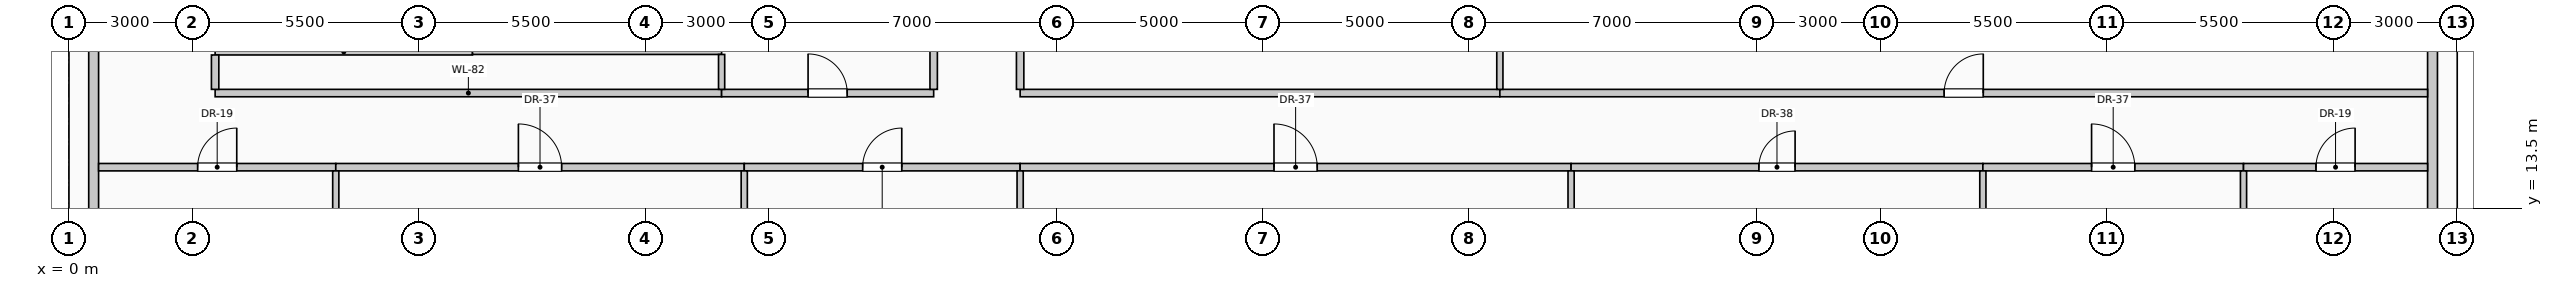
"""IFC4 building model, lengths in metres.
Left out: names, types, materials, properties, quantities, classifications, styles, units other than length and angle.
Written with IfcOpenShell. Run it as: python <this file> out.ifc"""

import sys

from ifc_helpers import new_model, si_unit, direction, frame, frame_2d, origin, place, context, subcontext, project, spatial, rectangle, extrude, element, fill, save


model = new_model("IFC4")
c1 = context("Model", 3, precision=1e-05, world=origin(), true_north=direction((0.0, 1.0)))
c2 = subcontext(c1, "Body", "Model", "MODEL_VIEW")
j1 = project(units=[si_unit("LENGTHUNIT", "METRE"), si_unit("PLANEANGLEUNIT", "RADIAN")], contexts=[c1])
p1 = place(None, origin())
s1 = spatial("IfcSite", under=j1, at=p1, CompositionType="ELEMENT")
p2 = place(p1, origin())
s2 = spatial("IfcBuilding", under=s1, at=p2, CompositionType="ELEMENT")
p3 = place(p2, frame((0.0, 0.0, 210.6)))
s3 = spatial("IfcBuildingStorey", under=s2, at=p3, CompositionType="ELEMENT", Elevation=210.6)
p4 = place(p3, frame((0.6, 10.42, 0.0), z_axis=(0.0, 0.0, 1.0), x_axis=(0.0, 1.0, 0.0)))
e1 = element("IfcWall", 1, at=p4, inside=s3, PredefinedType="SOLIDWALL", context=c2, shape_type="SweptSolid", body=[
    extrude(rectangle(XDim=7.16, YDim=0.24, at=frame_2d((3.58, 0.0))), origin(), (0.0, 0.0, 1.0), 3.0),
])
p5 = place(p4, frame((1.387, 0.0, 0.42)))
e2 = element("IfcOpeningElement", 2, at=p5, cuts=e1, PredefinedType="OPENING", context=c2, shape_type="SweptSolid", body=[
    extrude(rectangle(XDim=1.5, YDim=2.2, at=frame_2d((0.75, 1.1))), frame((0.0, 0.13, 0.0), z_axis=(0.0, -1.0, 0.0), x_axis=(1.0, 0.0, 0.0)), (0.0, 0.0, 1.0), 0.26),
])
p6 = place(p3, frame((57.4, 17.58, 0.0), z_axis=(0.0, 0.0, 1.0), x_axis=(0.0, -1.0, 0.0)))
e3 = element("IfcWall", 3, at=p6, inside=s3, PredefinedType="SOLIDWALL", context=c2, shape_type="SweptSolid", body=[
    extrude(rectangle(XDim=7.16, YDim=0.24, at=frame_2d((3.58, 0.0))), origin(), (0.0, 0.0, 1.0), 3.0),
])
p7 = place(p6, frame((4.273, 0.0, 0.42)))
e4 = element("IfcOpeningElement", 4, at=p7, cuts=e3, PredefinedType="OPENING", context=c2, shape_type="SweptSolid", body=[
    extrude(rectangle(XDim=1.5, YDim=2.2, at=frame_2d((0.75, 1.1))), frame((0.0, 0.13, 0.0), z_axis=(0.0, -1.0, 0.0), x_axis=(1.0, 0.0, 0.0)), (0.0, 0.0, 1.0), 0.26),
])
p8 = place(p3, frame((0.72, 14.5, 0.0), z_axis=(0.0, 0.0, 1.0), x_axis=(1.0, 0.0, 0.0)))
e5 = element("IfcWall", 5, at=p8, inside=s3, PredefinedType="PARTITIONING", context=c2, shape_type="SweptSolid", body=[
    extrude(rectangle(XDim=5.76, YDim=0.18, at=frame_2d((2.88, 0.0))), origin(), (0.0, 0.0, 1.0), 3.75),
])
p9 = place(p8, frame((2.405, 0.0, 0.0)))
e6 = element("IfcOpeningElement", 6, at=p9, cuts=e5, PredefinedType="OPENING", context=c2, shape_type="SweptSolid", body=[
    extrude(rectangle(XDim=0.95, YDim=2.15, at=frame_2d((0.475, 1.075))), frame((0.0, 0.1, 0.0), z_axis=(0.0, -1.0, 0.0), x_axis=(1.0, 0.0, 0.0)), (0.0, 0.0, 1.0), 0.2),
])
p10 = place(p3, frame((6.48, 14.5, 0.0), z_axis=(0.0, 0.0, 1.0), x_axis=(1.0, 0.0, 0.0)))
e7 = element("IfcWall", 7, at=p10, inside=s3, PredefinedType="PARTITIONING", context=c2, shape_type="SweptSolid", body=[
    extrude(rectangle(XDim=9.92, YDim=0.18, at=frame_2d((4.96, 0.0))), origin(), (0.0, 0.0, 1.0), 3.75),
])
p11 = place(p10, frame((4.435, 0.0, 0.0)))
e8 = element("IfcOpeningElement", 8, at=p11, cuts=e7, PredefinedType="OPENING", context=c2, shape_type="SweptSolid", body=[
    extrude(rectangle(XDim=1.05, YDim=2.15, at=frame_2d((0.525, 1.075))), frame((0.0, 0.1, 0.0), z_axis=(0.0, -1.0, 0.0), x_axis=(1.0, 0.0, 0.0)), (0.0, 0.0, 1.0), 0.2),
])
p12 = place(p3, frame((16.4, 14.5, 0.0), z_axis=(0.0, 0.0, 1.0), x_axis=(1.0, 0.0, 0.0)))
e9 = element("IfcWall", 9, at=p12, inside=s3, PredefinedType="PARTITIONING", context=c2, shape_type="SweptSolid", body=[
    extrude(rectangle(XDim=6.7, YDim=0.18, at=frame_2d((3.35, 0.0))), origin(), (0.0, 0.0, 1.0), 3.75),
])
p13 = place(p12, frame((2.875, 0.0, 0.0)))
e10 = element("IfcOpeningElement", 10, at=p13, cuts=e9, PredefinedType="OPENING", context=c2, shape_type="SweptSolid", body=[
    extrude(rectangle(XDim=0.95, YDim=2.15, at=frame_2d((0.475, 1.075))), frame((0.0, 0.1, 0.0), z_axis=(0.0, -1.0, 0.0), x_axis=(1.0, 0.0, 0.0)), (0.0, 0.0, 1.0), 0.2),
])
p14 = place(p3, frame((23.1, 14.5, 0.0), z_axis=(0.0, 0.0, 1.0), x_axis=(1.0, 0.0, 0.0)))
e11 = element("IfcWall", 11, at=p14, inside=s3, PredefinedType="PARTITIONING", context=c2, shape_type="SweptSolid", body=[
    extrude(rectangle(XDim=13.38, YDim=0.18, at=frame_2d((6.69, 0.0))), origin(), (0.0, 0.0, 1.0), 3.75),
])
p15 = place(p14, frame((6.165, 0.0, 0.0)))
e12 = element("IfcOpeningElement", 12, at=p15, cuts=e11, PredefinedType="OPENING", context=c2, shape_type="SweptSolid", body=[
    extrude(rectangle(XDim=1.05, YDim=2.15, at=frame_2d((0.525, 1.075))), frame((0.0, 0.1, 0.0), z_axis=(0.0, -1.0, 0.0), x_axis=(1.0, 0.0, 0.0)), (0.0, 0.0, 1.0), 0.2),
])
p16 = place(p3, frame((36.48, 14.5, 0.0), z_axis=(0.0, 0.0, 1.0), x_axis=(1.0, 0.0, 0.0)))
e13 = element("IfcWall", 13, at=p16, inside=s3, PredefinedType="PARTITIONING", context=c2, shape_type="SweptSolid", body=[
    extrude(rectangle(XDim=10.0, YDim=0.18, at=frame_2d((5.0, 0.0))), origin(), (0.0, 0.0, 1.0), 3.75),
])
p17 = place(p16, frame((4.56, 0.0, 0.0)))
e14 = element("IfcOpeningElement", 14, at=p17, cuts=e13, PredefinedType="OPENING", context=c2, shape_type="SweptSolid", body=[
    extrude(rectangle(XDim=0.88, YDim=2.1, at=frame_2d((0.44, 1.05))), frame((0.0, 0.1, 0.0), z_axis=(0.0, -1.0, 0.0), x_axis=(1.0, 0.0, 0.0)), (0.0, 0.0, 1.0), 0.2),
])
p18 = place(p3, frame((46.48, 14.5, 0.0), z_axis=(0.0, 0.0, 1.0), x_axis=(1.0, 0.0, 0.0)))
e15 = element("IfcWall", 15, at=p18, inside=s3, PredefinedType="PARTITIONING", context=c2, shape_type="SweptSolid", body=[
    extrude(rectangle(XDim=6.33, YDim=0.18, at=frame_2d((3.165, 0.0))), origin(), (0.0, 0.0, 1.0), 3.75),
])
p19 = place(p18, frame((2.64, 0.0, 0.0)))
e16 = element("IfcOpeningElement", 16, at=p19, cuts=e15, PredefinedType="OPENING", context=c2, shape_type="SweptSolid", body=[
    extrude(rectangle(XDim=1.05, YDim=2.15, at=frame_2d((0.525, 1.075))), frame((0.0, 0.1, 0.0), z_axis=(0.0, -1.0, 0.0), x_axis=(1.0, 0.0, 0.0)), (0.0, 0.0, 1.0), 0.2),
])
p20 = place(p3, frame((52.81, 14.5, 0.0), z_axis=(0.0, 0.0, 1.0), x_axis=(1.0, 0.0, 0.0)))
e17 = element("IfcWall", 17, at=p20, inside=s3, PredefinedType="PARTITIONING", context=c2, shape_type="SweptSolid", body=[
    extrude(rectangle(XDim=4.47, YDim=0.18, at=frame_2d((2.235, 0.0))), origin(), (0.0, 0.0, 1.0), 3.75),
])
p21 = place(p20, frame((1.76, 0.0, 0.0)))
e18 = element("IfcOpeningElement", 18, at=p21, cuts=e17, PredefinedType="OPENING", context=c2, shape_type="SweptSolid", body=[
    extrude(rectangle(XDim=0.95, YDim=2.15, at=frame_2d((0.475, 1.075))), frame((0.0, 0.1, 0.0), z_axis=(0.0, -1.0, 0.0), x_axis=(1.0, 0.0, 0.0)), (0.0, 0.0, 1.0), 0.2),
])
p22 = place(p3, frame((3.55, 16.3, 0.0), z_axis=(0.0, 0.0, 1.0), x_axis=(1.0, 0.0, 0.0)))
e19 = element("IfcWall", 19, at=p22, inside=s3, PredefinedType="PARTITIONING", context=c2, shape_type="SweptSolid", body=[
    extrude(rectangle(XDim=12.3, YDim=0.18, at=frame_2d((6.15, 0.0))), origin(), (0.0, 0.0, 1.0), 3.75),
])
p23 = place(p3, frame((15.85, 16.3, 0.0), z_axis=(0.0, 0.0, 1.0), x_axis=(1.0, 0.0, 0.0)))
e20 = element("IfcWall", 20, at=p23, inside=s3, PredefinedType="PARTITIONING", context=c2, shape_type="SweptSolid", body=[
    extrude(rectangle(XDim=5.15, YDim=0.18, at=frame_2d((2.575, 0.0))), origin(), (0.0, 0.0, 1.0), 3.75),
])
p24 = place(p23, frame((2.1, 0.0, 0.0)))
e21 = element("IfcOpeningElement", 21, at=p24, cuts=e20, PredefinedType="OPENING", context=c2, shape_type="SweptSolid", body=[
    extrude(rectangle(XDim=0.95, YDim=2.15, at=frame_2d((0.475, 1.075))), frame((0.0, 0.1, 0.0), z_axis=(0.0, -1.0, 0.0), x_axis=(1.0, 0.0, 0.0)), (0.0, 0.0, 1.0), 0.2),
])
p25 = place(p3, frame((23.1, 16.3, 0.0), z_axis=(0.0, 0.0, 1.0), x_axis=(1.0, 0.0, 0.0)))
e22 = element("IfcWall", 22, at=p25, inside=s3, PredefinedType="PARTITIONING", context=c2, shape_type="SweptSolid", body=[
    extrude(rectangle(XDim=11.65, YDim=0.18, at=frame_2d((5.825, 0.0))), origin(), (0.0, 0.0, 1.0), 3.75),
])
p26 = place(p3, frame((34.75, 16.3, 0.0), z_axis=(0.0, 0.0, 1.0), x_axis=(1.0, 0.0, 0.0)))
e23 = element("IfcWall", 23, at=p26, inside=s3, PredefinedType="PARTITIONING", context=c2, shape_type="SweptSolid", body=[
    extrude(rectangle(XDim=22.53, YDim=0.18, at=frame_2d((11.265, 0.0))), origin(), (0.0, 0.0, 1.0), 3.75),
])
p27 = place(p26, frame((10.79, 0.0, 0.0)))
e24 = element("IfcOpeningElement", 24, at=p27, cuts=e23, PredefinedType="OPENING", context=c2, shape_type="SweptSolid", body=[
    extrude(rectangle(XDim=0.95, YDim=2.15, at=frame_2d((0.475, 1.075))), frame((0.0, 0.1, 0.0), z_axis=(0.0, -1.0, 0.0), x_axis=(1.0, 0.0, 0.0)), (0.0, 0.0, 1.0), 0.2),
])
p28 = place(p3, frame((3.55, 17.3, 0.0), z_axis=(0.0, 0.0, 1.0), x_axis=(1.0, 0.0, 0.0)))
e25 = element("IfcWall", 25, at=p28, inside=s3, PredefinedType="PARTITIONING", context=c2, shape_type="SweptSolid", body=[
    extrude(rectangle(XDim=6.25, YDim=0.15, at=frame_2d((3.125, 0.0))), origin(), (0.0, 0.0, 1.0), 3.75),
])
p29 = place(p3, frame((9.8, 17.3, 0.0), z_axis=(0.0, 0.0, 1.0), x_axis=(1.0, 0.0, 0.0)))
e26 = element("IfcWall", 26, at=p29, inside=s3, PredefinedType="PARTITIONING", context=c2, shape_type="SweptSolid", body=[
    extrude(rectangle(XDim=6.05, YDim=0.125, at=frame_2d((3.025, 0.0))), origin(), (0.0, 0.0, 1.0), 3.75),
])
p30 = place(p3, frame((3.55, 16.39, 0.0), z_axis=(0.0, 0.0, 1.0), x_axis=(0.0, 1.0, 0.0)))
e27 = element("IfcWall", 27, at=p30, inside=s3, PredefinedType="PARTITIONING", context=c2, shape_type="SweptSolid", body=[
    extrude(rectangle(XDim=0.835, YDim=0.18, at=frame_2d((0.417, 0.0))), origin(), (0.0, 0.0, 1.0), 3.75),
])
p31 = place(p3, frame((6.48, 0.72, 0.0), z_axis=(0.0, 0.0, 1.0), x_axis=(0.0, 1.0, 0.0)))
e28 = element("IfcWall", 28, at=p31, inside=s3, PredefinedType="PARTITIONING", context=c2, shape_type="SweptSolid", body=[
    extrude(rectangle(XDim=13.69, YDim=0.15, at=frame_2d((6.845, 0.0))), origin(), (0.0, 0.0, 1.0), 3.75),
])
p32 = place(p3, frame((15.85, 16.39, 0.0), z_axis=(0.0, 0.0, 1.0), x_axis=(0.0, 1.0, 0.0)))
e29 = element("IfcWall", 29, at=p32, inside=s3, PredefinedType="PARTITIONING", context=c2, shape_type="SweptSolid", body=[
    extrude(rectangle(XDim=0.848, YDim=0.15, at=frame_2d((0.424, 0.0))), origin(), (0.0, 0.0, 1.0), 3.75),
])
p33 = place(p3, frame((16.4, 1.25, 0.0), z_axis=(0.0, 0.0, 1.0), x_axis=(0.0, 1.0, 0.0)))
e30 = element("IfcWall", 30, at=p33, inside=s3, PredefinedType="PARTITIONING", context=c2, shape_type="SweptSolid", body=[
    extrude(rectangle(XDim=13.16, YDim=0.15, at=frame_2d((6.58, 0.0))), origin(), (0.0, 0.0, 1.0), 3.145),
])
p34 = place(p3, frame((21.0, 16.39, 0.0), z_axis=(0.0, 0.0, 1.0), x_axis=(0.0, 1.0, 0.0)))
e31 = element("IfcWall", 31, at=p34, inside=s3, PredefinedType="PARTITIONING", context=c2, shape_type="SweptSolid", body=[
    extrude(rectangle(XDim=8.335, YDim=0.18, at=frame_2d((4.167, 0.0))), origin(), (0.0, 0.0, 1.0), 3.75),
])
p35 = place(p3, frame((23.1, 0.72, 0.0), z_axis=(0.0, 0.0, 1.0), x_axis=(0.0, 1.0, 0.0)))
e32 = element("IfcWall", 32, at=p35, inside=s3, PredefinedType="PARTITIONING", context=c2, shape_type="SweptSolid", body=[
    extrude(rectangle(XDim=13.69, YDim=0.15, at=frame_2d((6.845, 0.0))), origin(), (0.0, 0.0, 1.0), 3.75),
])
p36 = place(p3, frame((23.1, 16.39, 0.0), z_axis=(0.0, 0.0, 1.0), x_axis=(0.0, 1.0, 0.0)))
e33 = element("IfcWall", 33, at=p36, inside=s3, PredefinedType="PARTITIONING", context=c2, shape_type="SweptSolid", body=[
    extrude(rectangle(XDim=3.185, YDim=0.18, at=frame_2d((1.593, 0.0))), origin(), (0.0, 0.0, 1.0), 3.75),
])
p37 = place(p3, frame((34.75, 16.39, 0.0), z_axis=(0.0, 0.0, 1.0), x_axis=(0.0, 1.0, 0.0)))
e34 = element("IfcWall", 34, at=p37, inside=s3, PredefinedType="PARTITIONING", context=c2, shape_type="SweptSolid", body=[
    extrude(rectangle(XDim=3.185, YDim=0.15, at=frame_2d((1.593, 0.0))), origin(), (0.0, 0.0, 1.0), 3.75),
])
for number, where, z_axis, x_axis in (
    (35, (36.48, 0.72, 0.0), (0.0, 0.0, 1.0), (0.0, 1.0, 0.0)),
    (36, (46.48, 0.72, 0.0), (0.0, 0.0, 1.0), (0.0, 1.0, 0.0)),
    (37, (52.81, 0.72, 0.0), (0.0, 0.0, 1.0), (0.0, 1.0, 0.0)),
):
    element("IfcWall", number, at=place(p3, frame(where, z_axis=z_axis, x_axis=x_axis)), inside=s3, PredefinedType="PARTITIONING", context=c2, shape_type="SweptSolid", body=[
        extrude(rectangle(XDim=13.69, YDim=0.15, at=frame_2d((6.845, 0.0))), origin(), (0.0, 0.0, 1.0), 3.75),
    ])
p38 = place(p9, origin())
e38 = element("IfcDoor", 38, at=p38, inside=s3, OperationType="SINGLE_SWING_RIGHT", PredefinedType="DOOR", context=c2, shape_type="SweptSolid", body=[
    extrude(rectangle(XDim=0.95, YDim=2.15, at=frame_2d((0.475, 1.075))), frame((0.0, 0.025, 0.0), z_axis=(0.0, -1.0, 0.0), x_axis=(1.0, 0.0, 0.0)), (0.0, 0.0, 1.0), 0.05),
])
fill(e6, e38)
p39 = place(p11, origin())
e39 = element("IfcDoor", 39, at=p39, inside=s3, OperationType="SINGLE_SWING_LEFT", PredefinedType="DOOR", context=c2, shape_type="SweptSolid", body=[
    extrude(rectangle(XDim=1.05, YDim=2.15, at=frame_2d((0.525, 1.075))), frame((0.0, 0.025, 0.0), z_axis=(0.0, -1.0, 0.0), x_axis=(1.0, 0.0, 0.0)), (0.0, 0.0, 1.0), 0.05),
])
fill(e8, e39)
p40 = place(p13, origin())
e40 = element("IfcDoor", 40, at=p40, inside=s3, OperationType="SINGLE_SWING_RIGHT", PredefinedType="DOOR", context=c2, shape_type="SweptSolid", body=[
    extrude(rectangle(XDim=0.95, YDim=2.15, at=frame_2d((0.475, 1.075))), frame((0.0, 0.025, 0.0), z_axis=(0.0, -1.0, 0.0), x_axis=(1.0, 0.0, 0.0)), (0.0, 0.0, 1.0), 0.05),
])
fill(e10, e40)
p41 = place(p15, origin())
e41 = element("IfcDoor", 41, at=p41, inside=s3, OperationType="SINGLE_SWING_LEFT", PredefinedType="DOOR", context=c2, shape_type="SweptSolid", body=[
    extrude(rectangle(XDim=1.05, YDim=2.15, at=frame_2d((0.525, 1.075))), frame((0.0, 0.025, 0.0), z_axis=(0.0, -1.0, 0.0), x_axis=(1.0, 0.0, 0.0)), (0.0, 0.0, 1.0), 0.05),
])
fill(e12, e41)
p42 = place(p17, origin())
e42 = element("IfcDoor", 42, at=p42, inside=s3, OperationType="SINGLE_SWING_RIGHT", PredefinedType="DOOR", context=c2, shape_type="SweptSolid", body=[
    extrude(rectangle(XDim=0.88, YDim=2.1, at=frame_2d((0.44, 1.05))), frame((0.0, 0.025, 0.0), z_axis=(0.0, -1.0, 0.0), x_axis=(1.0, 0.0, 0.0)), (0.0, 0.0, 1.0), 0.05),
])
fill(e14, e42)
p43 = place(p19, origin())
e43 = element("IfcDoor", 43, at=p43, inside=s3, OperationType="SINGLE_SWING_LEFT", PredefinedType="DOOR", context=c2, shape_type="SweptSolid", body=[
    extrude(rectangle(XDim=1.05, YDim=2.15, at=frame_2d((0.525, 1.075))), frame((0.0, 0.025, 0.0), z_axis=(0.0, -1.0, 0.0), x_axis=(1.0, 0.0, 0.0)), (0.0, 0.0, 1.0), 0.05),
])
fill(e16, e43)
p44 = place(p21, origin())
e44 = element("IfcDoor", 44, at=p44, inside=s3, OperationType="SINGLE_SWING_RIGHT", PredefinedType="DOOR", context=c2, shape_type="SweptSolid", body=[
    extrude(rectangle(XDim=0.95, YDim=2.15, at=frame_2d((0.475, 1.075))), frame((0.0, 0.025, 0.0), z_axis=(0.0, -1.0, 0.0), x_axis=(1.0, 0.0, 0.0)), (0.0, 0.0, 1.0), 0.05),
])
fill(e18, e44)
p45 = place(p24, origin())
e45 = element("IfcDoor", 45, at=p45, inside=s3, OperationType="SINGLE_SWING_LEFT", PredefinedType="DOOR", context=c2, shape_type="SweptSolid", body=[
    extrude(rectangle(XDim=0.95, YDim=2.15, at=frame_2d((0.475, 1.075))), frame((0.0, 0.025, 0.0), z_axis=(0.0, -1.0, 0.0), x_axis=(1.0, 0.0, 0.0)), (0.0, 0.0, 1.0), 0.05),
])
fill(e21, e45)
p46 = place(p27, origin())
e46 = element("IfcDoor", 46, at=p46, inside=s3, OperationType="SINGLE_SWING_RIGHT", PredefinedType="DOOR", context=c2, shape_type="SweptSolid", body=[
    extrude(rectangle(XDim=0.95, YDim=2.15, at=frame_2d((0.475, 1.075))), frame((0.0, 0.025, 0.0), z_axis=(0.0, -1.0, 0.0), x_axis=(1.0, 0.0, 0.0)), (0.0, 0.0, 1.0), 0.05),
])
fill(e24, e46)
save(model, sys.argv[1])
